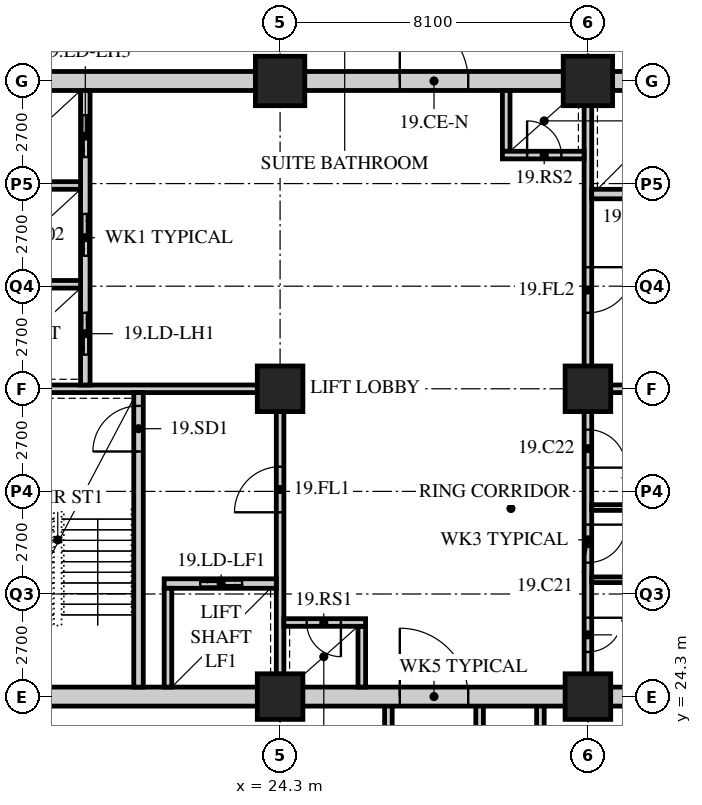
"""IFC4 building model, lengths in metres.
Left out: names, types, materials, properties, quantities, classifications, styles, units other than length and angle.
Written with IfcOpenShell. Run it as: python <this file> out.ifc"""

import sys

from ifc_helpers import new_model, si_unit, direction, frame, frame_2d, origin, origin_2d, place, context, subcontext, project, spatial, rectangle, hollow_rectangle, extrude, element, fill, save


model = new_model("IFC4")
c1 = context("Model", 3, precision=1e-05, world=origin(), true_north=direction((0.0, 1.0)))
c2 = subcontext(c1, "Body", "Model", "MODEL_VIEW")
j1 = project(units=[si_unit("LENGTHUNIT", "METRE"), si_unit("PLANEANGLEUNIT", "RADIAN")], contexts=[c1])
p1 = place(None, origin())
s1 = spatial("IfcSite", under=j1, at=p1, CompositionType="ELEMENT")
p2 = place(p1, origin())
s2 = spatial("IfcBuilding", under=s1, at=p2, CompositionType="ELEMENT")
p3 = place(p2, frame((0.0, 0.0, 77.2)))
s3 = spatial("IfcBuildingStorey", under=s2, at=p3, CompositionType="ELEMENT", Elevation=77.2)
for number, where, z_axis, x_axis in (
    (1, (24.3, 24.3, 0.0), (0.0, 0.0, 1.0), (1.0, 0.0, 0.0)),
    (2, (24.3, 32.4, 0.0), (0.0, 0.0, 1.0), (1.0, 0.0, 0.0)),
):
    element("IfcColumn", number, at=place(p3, frame(where, z_axis=z_axis, x_axis=x_axis)), inside=s3, PredefinedType="COLUMN", context=c2, shape_type="SweptSolid", body=[
        extrude(hollow_rectangle(XDim=1.2, YDim=1.2, WallThickness=0.12, at=origin_2d()), origin(), (0.0, 0.0, 1.0), 3.4),
    ])
p4 = place(p3, frame((24.3, 40.5, 0.0), z_axis=(0.0, 0.0, 1.0), x_axis=(1.0, 0.0, 0.0)))
e3 = element("IfcColumn", 3, at=p4, inside=s3, PredefinedType="COLUMN", context=c2, shape_type="SweptSolid", body=[
    extrude(hollow_rectangle(XDim=1.3, YDim=1.3, WallThickness=0.13, at=origin_2d()), origin(), (0.0, 0.0, 1.0), 3.4),
])
for number, where, z_axis, x_axis in (
    (4, (32.4, 24.3, 0.0), (0.0, 0.0, 1.0), (1.0, 0.0, 0.0)),
    (5, (32.4, 32.4, 0.0), (0.0, 0.0, 1.0), (1.0, 0.0, 0.0)),
):
    element("IfcColumn", number, at=place(p3, frame(where, z_axis=z_axis, x_axis=x_axis)), inside=s3, PredefinedType="COLUMN", context=c2, shape_type="SweptSolid", body=[
        extrude(hollow_rectangle(XDim=1.2, YDim=1.2, WallThickness=0.12, at=origin_2d()), origin(), (0.0, 0.0, 1.0), 3.4),
    ])
p5 = place(p3, frame((32.4, 40.5, 0.0), z_axis=(0.0, 0.0, 1.0), x_axis=(1.0, 0.0, 0.0)))
e6 = element("IfcColumn", 6, at=p5, inside=s3, PredefinedType="COLUMN", context=c2, shape_type="SweptSolid", body=[
    extrude(hollow_rectangle(XDim=1.3, YDim=1.3, WallThickness=0.13, at=origin_2d()), origin(), (0.0, 0.0, 1.0), 3.4),
])
for number, where, z_axis, x_axis in (
    (7, (31.15, 18.0, 0.0), (0.0, 0.0, 1.0), (0.0, 1.0, 0.0)),
    (8, (27.15, 18.0, 0.0), (0.0, 0.0, 1.0), (0.0, 1.0, 0.0)),
    (9, (29.55, 18.0, 0.0), (0.0, 0.0, 1.0), (0.0, 1.0, 0.0)),
):
    element("IfcWall", number, at=place(p3, frame(where, z_axis=z_axis, x_axis=x_axis)), inside=s3, PredefinedType="SOLIDWALL", context=c2, shape_type="SweptSolid", body=[
        extrude(rectangle(XDim=6.3, YDim=0.2, at=frame_2d((3.15, 0.0))), origin(), (0.0, 0.0, 1.0), 3.19),
    ])
p6 = place(p3, frame((15.95, 24.3, 0.0), z_axis=(0.0, 0.0, 1.0), x_axis=(1.0, 0.0, 0.0)))
e10 = element("IfcWall", 10, at=p6, inside=s3, PredefinedType="SOLIDWALL", context=c2, shape_type="SweptSolid", body=[
    extrude(rectangle(XDim=24.8, YDim=0.5, at=frame_2d((12.4, 0.0))), origin(), (0.0, 0.0, 1.0), 2.428),
])
p7 = place(p6, frame((11.5, 0.0, 0.0)))
e11 = element("IfcOpeningElement", 11, at=p7, cuts=e10, PredefinedType="OPENING", context=c2, shape_type="SweptSolid", body=[
    extrude(rectangle(XDim=1.8, YDim=2.4, at=frame_2d((0.9, 1.2))), frame((0.0, 0.26, 0.0), z_axis=(0.0, -1.0, 0.0), x_axis=(1.0, 0.0, 0.0)), (0.0, 0.0, 1.0), 0.52),
])
p8 = place(p3, frame((15.95, 40.5, 0.0), z_axis=(0.0, 0.0, 1.0), x_axis=(1.0, 0.0, 0.0)))
e12 = element("IfcWall", 12, at=p8, inside=s3, PredefinedType="SOLIDWALL", context=c2, shape_type="SweptSolid", body=[
    extrude(rectangle(XDim=24.8, YDim=0.5, at=frame_2d((12.4, 0.0))), origin(), (0.0, 0.0, 1.0), 2.428),
])
p9 = place(p8, frame((11.5, 0.0, 0.0)))
e13 = element("IfcOpeningElement", 13, at=p9, cuts=e12, PredefinedType="OPENING", context=c2, shape_type="SweptSolid", body=[
    extrude(rectangle(XDim=1.8, YDim=2.4, at=frame_2d((0.9, 1.2))), frame((0.0, 0.26, 0.0), z_axis=(0.0, -1.0, 0.0), x_axis=(1.0, 0.0, 0.0)), (0.0, 0.0, 1.0), 0.52),
])
p10 = place(p3, frame((16.45, 32.4, 0.0), z_axis=(0.0, 0.0, 1.0), x_axis=(1.0, 0.0, 0.0)))
e14 = element("IfcWall", 14, at=p10, inside=s3, PredefinedType="SOLIDWALL", context=c2, shape_type="SweptSolid", body=[
    extrude(rectangle(XDim=7.95, YDim=0.2, at=frame_2d((3.975, 0.0))), origin(), (0.0, 0.0, 1.0), 2.578),
])
p11 = place(p3, frame((24.3, 24.55, 0.0), z_axis=(0.0, 0.0, 1.0), x_axis=(0.0, 1.0, 0.0)))
e15 = element("IfcWall", 15, at=p11, inside=s3, PredefinedType="SOLIDWALL", context=c2, shape_type="SweptSolid", body=[
    extrude(rectangle(XDim=7.75, YDim=0.2, at=frame_2d((3.875, 0.0))), origin(), (0.0, 0.0, 1.0), 2.578),
])
p12 = place(p11, frame((4.6, 0.0, 0.0)))
e16 = element("IfcOpeningElement", 16, at=p12, cuts=e15, PredefinedType="OPENING", context=c2, shape_type="SweptSolid", body=[
    extrude(rectangle(XDim=1.2, YDim=2.1, at=frame_2d((0.6, 1.05))), frame((0.0, 0.11, 0.0), z_axis=(0.0, -1.0, 0.0), x_axis=(1.0, 0.0, 0.0)), (0.0, 0.0, 1.0), 0.22),
])
p13 = place(p3, frame((20.575, 24.55, 0.0), z_axis=(0.0, 0.0, 1.0), x_axis=(0.0, 1.0, 0.0)))
e17 = element("IfcWall", 17, at=p13, inside=s3, PredefinedType="SOLIDWALL", context=c2, shape_type="SweptSolid", body=[
    extrude(rectangle(XDim=7.75, YDim=0.25, at=frame_2d((3.875, 0.0))), origin(), (0.0, 0.0, 1.0), 3.19),
])
p14 = place(p13, frame((6.2, 0.0, 0.0)))
e18 = element("IfcOpeningElement", 18, at=p14, cuts=e17, PredefinedType="OPENING", context=c2, shape_type="SweptSolid", body=[
    extrude(rectangle(XDim=1.2, YDim=2.1, at=frame_2d((0.6, 1.05))), frame((0.0, 0.135, 0.0), z_axis=(0.0, -1.0, 0.0), x_axis=(1.0, 0.0, 0.0)), (0.0, 0.0, 1.0), 0.27),
])
p15 = place(p3, frame((21.25, 27.275, 0.0), z_axis=(0.0, 0.0, 1.0), x_axis=(1.0, 0.0, 0.0)))
e19 = element("IfcWall", 19, at=p15, inside=s3, PredefinedType="SOLIDWALL", context=c2, shape_type="SweptSolid", body=[
    extrude(rectangle(XDim=2.95, YDim=0.25, at=frame_2d((1.475, 0.0))), origin(), (0.0, 0.0, 1.0), 3.19),
])
p16 = place(p15, frame((0.95, 0.0, 0.0)))
e20 = element("IfcOpeningElement", 20, at=p16, cuts=e19, PredefinedType="OPENING", context=c2, shape_type="SweptSolid", body=[
    extrude(rectangle(XDim=1.1, YDim=2.4, at=frame_2d((0.55, 1.2))), frame((0.0, 0.135, 0.0), z_axis=(0.0, -1.0, 0.0), x_axis=(1.0, 0.0, 0.0)), (0.0, 0.0, 1.0), 0.27),
])
p17 = place(p3, frame((21.35, 24.55, 0.0), z_axis=(0.0, 0.0, 1.0), x_axis=(0.0, 1.0, 0.0)))
e21 = element("IfcWall", 21, at=p17, inside=s3, PredefinedType="SOLIDWALL", context=c2, shape_type="SweptSolid", body=[
    extrude(rectangle(XDim=2.6, YDim=0.2, at=frame_2d((1.3, 0.0))), origin(), (0.0, 0.0, 1.0), 3.19),
])
p18 = place(p3, frame((19.175, 32.5, 0.0), z_axis=(0.0, 0.0, 1.0), x_axis=(0.0, 1.0, 0.0)))
e22 = element("IfcWall", 22, at=p18, inside=s3, PredefinedType="SOLIDWALL", context=c2, shape_type="SweptSolid", body=[
    extrude(rectangle(XDim=7.75, YDim=0.25, at=frame_2d((3.875, 0.0))), origin(), (0.0, 0.0, 1.0), 3.19),
])
p19 = place(p18, frame((0.8, 0.0, 0.0)))
e23 = element("IfcOpeningElement", 23, at=p19, cuts=e22, PredefinedType="OPENING", context=c2, shape_type="SweptSolid", body=[
    extrude(rectangle(XDim=1.1, YDim=2.4, at=frame_2d((0.55, 1.2))), frame((0.0, 0.135, 0.0), z_axis=(0.0, -1.0, 0.0), x_axis=(1.0, 0.0, 0.0)), (0.0, 0.0, 1.0), 0.27),
])
p20 = place(p18, frame((3.4, 0.0, 0.0)))
e24 = element("IfcOpeningElement", 24, at=p20, cuts=e22, PredefinedType="OPENING", context=c2, shape_type="SweptSolid", body=[
    extrude(rectangle(XDim=1.1, YDim=2.4, at=frame_2d((0.55, 1.2))), frame((0.0, 0.135, 0.0), z_axis=(0.0, -1.0, 0.0), x_axis=(1.0, 0.0, 0.0)), (0.0, 0.0, 1.0), 0.27),
])
p21 = place(p18, frame((6.0, 0.0, 0.0)))
e25 = element("IfcOpeningElement", 25, at=p21, cuts=e22, PredefinedType="OPENING", context=c2, shape_type="SweptSolid", body=[
    extrude(rectangle(XDim=1.1, YDim=2.4, at=frame_2d((0.55, 1.2))), frame((0.0, 0.135, 0.0), z_axis=(0.0, -1.0, 0.0), x_axis=(1.0, 0.0, 0.0)), (0.0, 0.0, 1.0), 0.27),
])
for number, where, z_axis, x_axis in (
    (26, (16.45, 35.15, 0.0), (0.0, 0.0, 1.0), (1.0, 0.0, 0.0)),
    (27, (16.45, 37.75, 0.0), (0.0, 0.0, 1.0), (1.0, 0.0, 0.0)),
):
    element("IfcWall", number, at=place(p3, frame(where, z_axis=z_axis, x_axis=x_axis)), inside=s3, PredefinedType="SOLIDWALL", context=c2, shape_type="SweptSolid", body=[
        extrude(rectangle(XDim=2.6, YDim=0.2, at=frame_2d((1.3, 0.0))), origin(), (0.0, 0.0, 1.0), 3.19),
    ])
p22 = place(p3, frame((26.45, 24.55, 0.0), z_axis=(0.0, 0.0, 1.0), x_axis=(0.0, 1.0, 0.0)))
e28 = element("IfcWall", 28, at=p22, inside=s3, PredefinedType="SOLIDWALL", context=c2, shape_type="SweptSolid", body=[
    extrude(rectangle(XDim=1.6, YDim=0.2, at=frame_2d((0.8, 0.0))), origin(), (0.0, 0.0, 1.0), 3.19),
])
p23 = place(p3, frame((24.4, 26.25, 0.0), z_axis=(0.0, 0.0, 1.0), x_axis=(1.0, 0.0, 0.0)))
e29 = element("IfcWall", 29, at=p23, inside=s3, PredefinedType="SOLIDWALL", context=c2, shape_type="SweptSolid", body=[
    extrude(rectangle(XDim=2.15, YDim=0.2, at=frame_2d((1.075, 0.0))), origin(), (0.0, 0.0, 1.0), 3.19),
])
p24 = place(p23, frame((0.6, 0.0, 0.0)))
e30 = element("IfcOpeningElement", 30, at=p24, cuts=e29, PredefinedType="OPENING", context=c2, shape_type="SweptSolid", body=[
    extrude(rectangle(XDim=0.9, YDim=2.1, at=frame_2d((0.45, 1.05))), frame((0.0, 0.11, 0.0), z_axis=(0.0, -1.0, 0.0), x_axis=(1.0, 0.0, 0.0)), (0.0, 0.0, 1.0), 0.22),
])
p25 = place(p3, frame((32.3, 32.4, 0.0), z_axis=(0.0, 0.0, 1.0), x_axis=(1.0, 0.0, 0.0)))
e31 = element("IfcWall", 31, at=p25, inside=s3, PredefinedType="SOLIDWALL", context=c2, shape_type="SweptSolid", body=[
    extrude(rectangle(XDim=7.95, YDim=0.2, at=frame_2d((3.975, 0.0))), origin(), (0.0, 0.0, 1.0), 2.578),
])
p26 = place(p3, frame((32.4, 32.5, 0.0), z_axis=(0.0, 0.0, 1.0), x_axis=(0.0, 1.0, 0.0)))
e32 = element("IfcWall", 32, at=p26, inside=s3, PredefinedType="SOLIDWALL", context=c2, shape_type="SweptSolid", body=[
    extrude(rectangle(XDim=7.75, YDim=0.2, at=frame_2d((3.875, 0.0))), origin(), (0.0, 0.0, 1.0), 2.578),
])
p27 = place(p26, frame((1.9, 0.0, 0.0)))
e33 = element("IfcOpeningElement", 33, at=p27, cuts=e32, PredefinedType="OPENING", context=c2, shape_type="SweptSolid", body=[
    extrude(rectangle(XDim=1.2, YDim=2.1, at=frame_2d((0.6, 1.05))), frame((0.0, 0.11, 0.0), z_axis=(0.0, -1.0, 0.0), x_axis=(1.0, 0.0, 0.0)), (0.0, 0.0, 1.0), 0.22),
])
p28 = place(p3, frame((32.5, 37.525, 0.0), z_axis=(0.0, 0.0, 1.0), x_axis=(1.0, 0.0, 0.0)))
e34 = element("IfcWall", 34, at=p28, inside=s3, PredefinedType="SOLIDWALL", context=c2, shape_type="SweptSolid", body=[
    extrude(rectangle(XDim=2.95, YDim=0.25, at=frame_2d((1.475, 0.0))), origin(), (0.0, 0.0, 1.0), 3.19),
])
p29 = place(p28, frame((0.9, 0.0, 0.0)))
e35 = element("IfcOpeningElement", 35, at=p29, cuts=e34, PredefinedType="OPENING", context=c2, shape_type="SweptSolid", body=[
    extrude(rectangle(XDim=1.1, YDim=2.4, at=frame_2d((0.55, 1.2))), frame((0.0, 0.135, 0.0), z_axis=(0.0, -1.0, 0.0), x_axis=(1.0, 0.0, 0.0)), (0.0, 0.0, 1.0), 0.27),
])
p30 = place(p3, frame((30.25, 38.65, 0.0), z_axis=(0.0, 0.0, 1.0), x_axis=(0.0, 1.0, 0.0)))
e36 = element("IfcWall", 36, at=p30, inside=s3, PredefinedType="SOLIDWALL", context=c2, shape_type="SweptSolid", body=[
    extrude(rectangle(XDim=1.6, YDim=0.2, at=frame_2d((0.8, 0.0))), origin(), (0.0, 0.0, 1.0), 3.19),
])
p31 = place(p3, frame((30.15, 38.55, 0.0), z_axis=(0.0, 0.0, 1.0), x_axis=(1.0, 0.0, 0.0)))
e37 = element("IfcWall", 37, at=p31, inside=s3, PredefinedType="SOLIDWALL", context=c2, shape_type="SweptSolid", body=[
    extrude(rectangle(XDim=2.15, YDim=0.2, at=frame_2d((1.075, 0.0))), origin(), (0.0, 0.0, 1.0), 3.19),
])
p32 = place(p31, frame((0.65, 0.0, 0.0)))
e38 = element("IfcOpeningElement", 38, at=p32, cuts=e37, PredefinedType="OPENING", context=c2, shape_type="SweptSolid", body=[
    extrude(rectangle(XDim=0.9, YDim=2.1, at=frame_2d((0.45, 1.05))), frame((0.0, 0.11, 0.0), z_axis=(0.0, -1.0, 0.0), x_axis=(1.0, 0.0, 0.0)), (0.0, 0.0, 1.0), 0.22),
])
p33 = place(p3, frame((32.4, 24.55, 0.0), z_axis=(0.0, 0.0, 1.0), x_axis=(0.0, 1.0, 0.0)))
e39 = element("IfcWall", 39, at=p33, inside=s3, PredefinedType="PARTITIONING", context=c2, shape_type="SweptSolid", body=[
    extrude(rectangle(XDim=7.75, YDim=0.2, at=frame_2d((3.875, 0.0))), origin(), (0.0, 0.0, 1.0), 2.578),
])
p34 = place(p33, frame((0.925, 0.0, 0.0)))
e40 = element("IfcOpeningElement", 40, at=p34, cuts=e39, PredefinedType="OPENING", context=c2, shape_type="SweptSolid", body=[
    extrude(rectangle(XDim=0.9, YDim=2.1, at=frame_2d((0.45, 1.05))), frame((0.0, 0.11, 0.0), z_axis=(0.0, -1.0, 0.0), x_axis=(1.0, 0.0, 0.0)), (0.0, 0.0, 1.0), 0.22),
])
p35 = place(p33, frame((3.275, 0.0, 0.0)))
e41 = element("IfcOpeningElement", 41, at=p35, cuts=e39, PredefinedType="OPENING", context=c2, shape_type="SweptSolid", body=[
    extrude(rectangle(XDim=1.0, YDim=2.1, at=frame_2d((0.5, 1.05))), frame((0.0, 0.11, 0.0), z_axis=(0.0, -1.0, 0.0), x_axis=(1.0, 0.0, 0.0)), (0.0, 0.0, 1.0), 0.22),
])
p36 = place(p33, frame((5.775, 0.0, 0.0)))
e42 = element("IfcOpeningElement", 42, at=p36, cuts=e39, PredefinedType="OPENING", context=c2, shape_type="SweptSolid", body=[
    extrude(rectangle(XDim=1.0, YDim=2.1, at=frame_2d((0.5, 1.05))), frame((0.0, 0.11, 0.0), z_axis=(0.0, -1.0, 0.0), x_axis=(1.0, 0.0, 0.0)), (0.0, 0.0, 1.0), 0.22),
])
p37 = place(p3, frame((32.5, 27.375, 0.0), z_axis=(0.0, 0.0, 1.0), x_axis=(1.0, 0.0, 0.0)))
e43 = element("IfcWall", 43, at=p37, inside=s3, PredefinedType="PARTITIONING", context=c2, shape_type="SweptSolid", body=[
    extrude(rectangle(XDim=2.15, YDim=0.15, at=frame_2d((1.075, 0.0))), origin(), (0.0, 0.0, 1.0), 3.19),
])
p38 = place(p3, frame((32.5, 29.275, 0.0), z_axis=(0.0, 0.0, 1.0), x_axis=(1.0, 0.0, 0.0)))
e44 = element("IfcWall", 44, at=p38, inside=s3, PredefinedType="PARTITIONING", context=c2, shape_type="SweptSolid", body=[
    extrude(rectangle(XDim=4.9, YDim=0.15, at=frame_2d((2.45, 0.0))), origin(), (0.0, 0.0, 1.0), 3.19),
])
p39 = place(p34, origin())
e45 = element("IfcDoor", 45, at=p39, inside=s3, OperationType="SINGLE_SWING_LEFT", PredefinedType="DOOR", context=c2, shape_type="SweptSolid", body=[
    extrude(rectangle(XDim=0.9, YDim=2.1, at=frame_2d((0.45, 1.05))), frame((0.0, 0.025, 0.0), z_axis=(0.0, -1.0, 0.0), x_axis=(1.0, 0.0, 0.0)), (0.0, 0.0, 1.0), 0.05),
])
fill(e40, e45)
p40 = place(p35, origin())
e46 = element("IfcDoor", 46, at=p40, inside=s3, OperationType="SINGLE_SWING_LEFT", PredefinedType="DOOR", context=c2, shape_type="SweptSolid", body=[
    extrude(rectangle(XDim=1.0, YDim=2.1, at=frame_2d((0.5, 1.05))), frame((0.0, 0.025, 0.0), z_axis=(0.0, -1.0, 0.0), x_axis=(1.0, 0.0, 0.0)), (0.0, 0.0, 1.0), 0.05),
])
fill(e41, e46)
p41 = place(p36, origin())
e47 = element("IfcDoor", 47, at=p41, inside=s3, OperationType="SINGLE_SWING_RIGHT", PredefinedType="DOOR", context=c2, shape_type="SweptSolid", body=[
    extrude(rectangle(XDim=1.0, YDim=2.1, at=frame_2d((0.5, 1.05))), frame((0.0, 0.025, 0.0), z_axis=(0.0, -1.0, 0.0), x_axis=(1.0, 0.0, 0.0)), (0.0, 0.0, 1.0), 0.05),
])
fill(e42, e47)
p42 = place(p14, origin())
e48 = element("IfcDoor", 48, at=p42, inside=s3, OperationType="SINGLE_SWING_LEFT", PredefinedType="DOOR", context=c2, shape_type="SweptSolid", body=[
    extrude(rectangle(XDim=1.2, YDim=2.1, at=frame_2d((0.6, 1.05))), frame((0.0, 0.025, 0.0), z_axis=(0.0, -1.0, 0.0), x_axis=(1.0, 0.0, 0.0)), (0.0, 0.0, 1.0), 0.05),
])
fill(e18, e48)
p43 = place(p12, origin())
e49 = element("IfcDoor", 49, at=p43, inside=s3, OperationType="SINGLE_SWING_LEFT", PredefinedType="DOOR", context=c2, shape_type="SweptSolid", body=[
    extrude(rectangle(XDim=1.2, YDim=2.1, at=frame_2d((0.6, 1.05))), frame((0.0, 0.025, 0.0), z_axis=(0.0, -1.0, 0.0), x_axis=(1.0, 0.0, 0.0)), (0.0, 0.0, 1.0), 0.05),
])
fill(e16, e49)
p44 = place(p24, origin())
e50 = element("IfcDoor", 50, at=p44, inside=s3, OperationType="SINGLE_SWING_LEFT", PredefinedType="DOOR", context=c2, shape_type="SweptSolid", body=[
    extrude(rectangle(XDim=0.9, YDim=2.1, at=frame_2d((0.45, 1.05))), frame((0.0, 0.025, 0.0), z_axis=(0.0, -1.0, 0.0), x_axis=(1.0, 0.0, 0.0)), (0.0, 0.0, 1.0), 0.05),
])
fill(e30, e50)
p45 = place(p27, origin())
e51 = element("IfcDoor", 51, at=p45, inside=s3, OperationType="SINGLE_SWING_LEFT", PredefinedType="DOOR", context=c2, shape_type="SweptSolid", body=[
    extrude(rectangle(XDim=1.2, YDim=2.1, at=frame_2d((0.6, 1.05))), frame((0.0, 0.025, 0.0), z_axis=(0.0, -1.0, 0.0), x_axis=(1.0, 0.0, 0.0)), (0.0, 0.0, 1.0), 0.05),
])
fill(e33, e51)
p46 = place(p32, origin())
e52 = element("IfcDoor", 52, at=p46, inside=s3, OperationType="SINGLE_SWING_LEFT", PredefinedType="DOOR", context=c2, shape_type="SweptSolid", body=[
    extrude(rectangle(XDim=0.9, YDim=2.1, at=frame_2d((0.45, 1.05))), frame((0.0, 0.025, 0.0), z_axis=(0.0, -1.0, 0.0), x_axis=(1.0, 0.0, 0.0)), (0.0, 0.0, 1.0), 0.05),
])
fill(e38, e52)
p47 = place(p19, origin())
e53 = element("IfcDoor", 53, at=p47, inside=s3, OperationType="DOUBLE_DOOR_SLIDING", PredefinedType="DOOR", context=c2, shape_type="SweptSolid", body=[
    extrude(rectangle(XDim=1.1, YDim=2.4, at=frame_2d((0.55, 1.2))), frame((0.0, 0.025, 0.0), z_axis=(0.0, -1.0, 0.0), x_axis=(1.0, 0.0, 0.0)), (0.0, 0.0, 1.0), 0.05),
])
fill(e23, e53)
p48 = place(p20, origin())
e54 = element("IfcDoor", 54, at=p48, inside=s3, OperationType="DOUBLE_DOOR_SLIDING", PredefinedType="DOOR", context=c2, shape_type="SweptSolid", body=[
    extrude(rectangle(XDim=1.1, YDim=2.4, at=frame_2d((0.55, 1.2))), frame((0.0, 0.025, 0.0), z_axis=(0.0, -1.0, 0.0), x_axis=(1.0, 0.0, 0.0)), (0.0, 0.0, 1.0), 0.05),
])
fill(e24, e54)
p49 = place(p21, origin())
e55 = element("IfcDoor", 55, at=p49, inside=s3, OperationType="DOUBLE_DOOR_SLIDING", PredefinedType="DOOR", context=c2, shape_type="SweptSolid", body=[
    extrude(rectangle(XDim=1.1, YDim=2.4, at=frame_2d((0.55, 1.2))), frame((0.0, 0.025, 0.0), z_axis=(0.0, -1.0, 0.0), x_axis=(1.0, 0.0, 0.0)), (0.0, 0.0, 1.0), 0.05),
])
fill(e25, e55)
p50 = place(p16, origin())
e56 = element("IfcDoor", 56, at=p50, inside=s3, OperationType="DOUBLE_DOOR_SLIDING", PredefinedType="DOOR", context=c2, shape_type="SweptSolid", body=[
    extrude(rectangle(XDim=1.1, YDim=2.4, at=frame_2d((0.55, 1.2))), frame((0.0, 0.025, 0.0), z_axis=(0.0, -1.0, 0.0), x_axis=(1.0, 0.0, 0.0)), (0.0, 0.0, 1.0), 0.05),
])
fill(e20, e56)
p51 = place(p7, origin())
e57 = element("IfcDoor", 57, at=p51, inside=s3, OperationType="DOUBLE_DOOR_SINGLE_SWING", PredefinedType="DOOR", context=c2, shape_type="SweptSolid", body=[
    extrude(rectangle(XDim=1.8, YDim=2.4, at=frame_2d((0.9, 1.2))), frame((0.0, 0.025, 0.0), z_axis=(0.0, -1.0, 0.0), x_axis=(1.0, 0.0, 0.0)), (0.0, 0.0, 1.0), 0.05),
])
fill(e11, e57)
p52 = place(p9, origin())
e58 = element("IfcDoor", 58, at=p52, inside=s3, OperationType="DOUBLE_DOOR_SINGLE_SWING", PredefinedType="DOOR", context=c2, shape_type="SweptSolid", body=[
    extrude(rectangle(XDim=1.8, YDim=2.4, at=frame_2d((0.9, 1.2))), frame((0.0, 0.025, 0.0), z_axis=(0.0, -1.0, 0.0), x_axis=(1.0, 0.0, 0.0)), (0.0, 0.0, 1.0), 0.05),
])
fill(e13, e58)
save(model, sys.argv[1])
